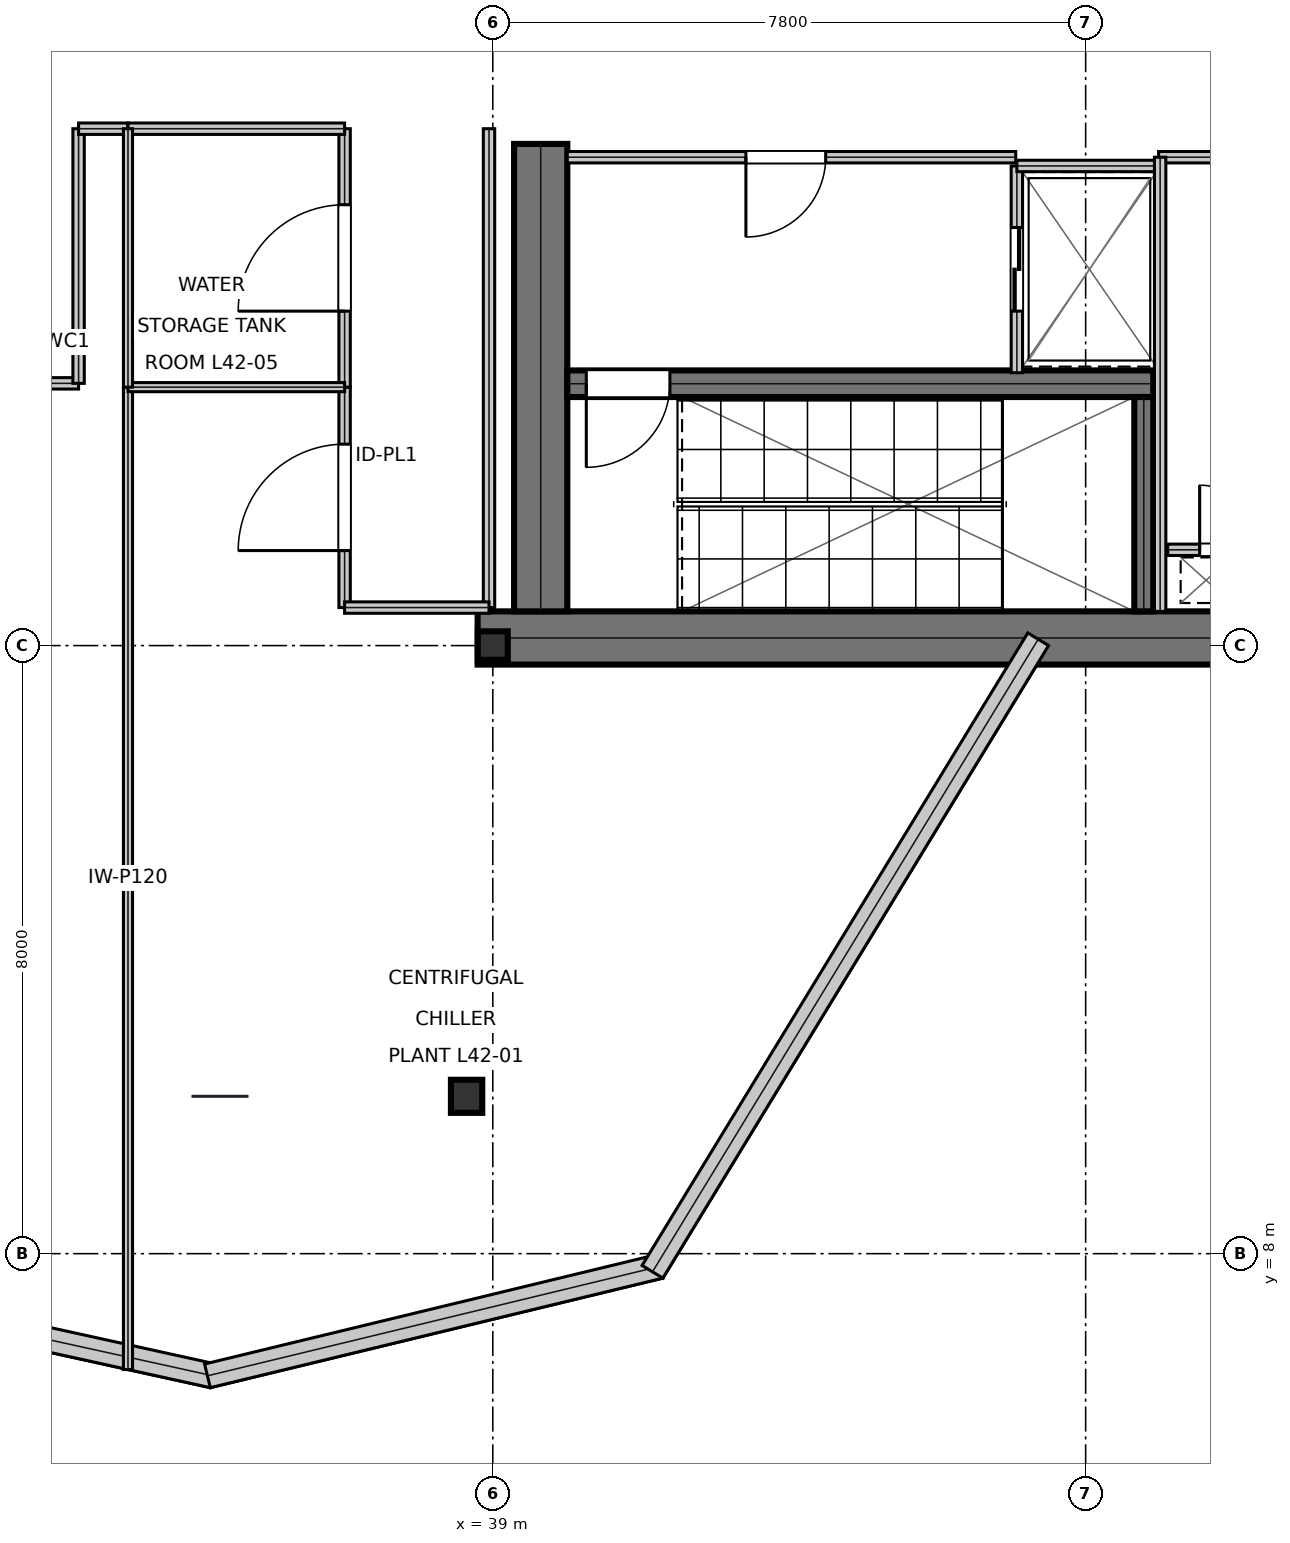
"""IFC4 building model, lengths in metres.
Left out: names, types, materials, properties, quantities, classifications, styles, units other than length and angle.
Written with IfcOpenShell. Run it as: python <this file> out.ifc"""

import sys

from ifc_helpers import new_model, si_unit, direction, frame, frame_2d, origin, origin_2d, place, context, subcontext, project, spatial, rectangle, i_section, extrude, element, fill, save


model = new_model("IFC4")
c1 = context("Model", 3, precision=1e-05, world=origin(), true_north=direction((0.0, 1.0)))
c2 = subcontext(c1, "Body", "Model", "MODEL_VIEW")
j1 = project(units=[si_unit("LENGTHUNIT", "METRE"), si_unit("PLANEANGLEUNIT", "RADIAN")], contexts=[c1])
p1 = place(None, origin())
s1 = spatial("IfcSite", under=j1, at=p1, CompositionType="ELEMENT")
p2 = place(p1, origin())
s2 = spatial("IfcBuilding", under=s1, at=p2, CompositionType="ELEMENT")
p3 = place(p2, frame((0.0, 0.0, 181.65)))
s3 = spatial("IfcBuildingStorey", under=s2, at=p3, CompositionType="ELEMENT", Elevation=181.65)
p4 = place(p3, frame((38.8, 16.1, 0.0), z_axis=(0.0, 0.0, 1.0), x_axis=(1.0, 0.0, 0.0)))
e1 = element("IfcWall", 1, at=p4, inside=s3, PredefinedType="SHEAR", context=c2, shape_type="SweptSolid", body=[
    extrude(rectangle(XDim=16.0, YDim=0.7, at=frame_2d((8.0, 0.0))), origin(), (0.0, 0.0, 1.0), 5.12),
])
p5 = place(p3, frame((39.63, 16.45, 0.0), z_axis=(0.0, 0.0, 1.0), x_axis=(0.0, 1.0, 0.0)))
e2 = element("IfcWall", 2, at=p5, inside=s3, PredefinedType="SHEAR", context=c2, shape_type="SweptSolid", body=[
    extrude(rectangle(XDim=6.15, YDim=0.7, at=frame_2d((3.075, 0.0))), origin(), (0.0, 0.0, 1.0), 5.12),
])
p6 = place(p3, frame((39.98, 19.445, 0.0), z_axis=(0.0, 0.0, 1.0), x_axis=(1.0, 0.0, 0.0)))
e3 = element("IfcWall", 3, at=p6, inside=s3, PredefinedType="SHEAR", context=c2, shape_type="SweptSolid", body=[
    extrude(rectangle(XDim=7.71, YDim=0.35, at=frame_2d((3.855, 0.0))), origin(), (0.0, 0.0, 1.0), 5.12),
])
p7 = place(p6, frame((0.25, 0.0, 0.0)))
e4 = element("IfcOpeningElement", 4, at=p7, cuts=e3, PredefinedType="OPENING", context=c2, shape_type="SweptSolid", body=[
    extrude(rectangle(XDim=1.1, YDim=2.15, at=frame_2d((0.55, 1.075))), frame((0.0, 0.185, 0.0), z_axis=(0.0, -1.0, 0.0), x_axis=(1.0, 0.0, 0.0)), (0.0, 0.0, 1.0), 0.37),
])
p8 = place(p3, frame((47.565, 16.45, 0.0), z_axis=(0.0, 0.0, 1.0), x_axis=(0.0, 1.0, 0.0)))
e5 = element("IfcWall", 5, at=p8, inside=s3, PredefinedType="SHEAR", context=c2, shape_type="SweptSolid", body=[
    extrude(rectangle(XDim=2.82, YDim=0.25, at=frame_2d((1.41, 0.0))), origin(), (0.0, 0.0, 1.0), 5.12),
])
p9 = place(p3, frame((39.0, 16.0, 0.0), z_axis=(0.0, 0.0, 1.0), x_axis=(1.0, 0.0, 0.0)))
e6 = element("IfcColumn", 6, at=p9, inside=s3, PredefinedType="COLUMN", context=c2, shape_type="SweptSolid", body=[
    extrude(i_section(OverallWidth=0.394, OverallDepth=0.375, WebThickness=0.017, FlangeThickness=0.028, at=origin_2d()), origin(), (0.0, 0.0, 1.0), 5.394),
])
p10 = place(p3, frame((38.655, 10.07, 0.016), z_axis=(-0.002410254638, 0.014507004333, 0.999891862902), x_axis=(-0.98647737489, -0.163897494888, 0.0)))
e7 = element("IfcColumn", 7, at=p10, inside=s3, PredefinedType="COLUMN", context=c2, shape_type="SweptSolid", body=[
    extrude(i_section(OverallWidth=0.412, OverallDepth=0.435, WebThickness=0.036, FlangeThickness=0.058, at=origin_2d()), origin(), (0.0, 0.0, 1.0), 5.368),
])
p11 = place(p3, frame((29.363, 7.703, 0.0), z_axis=(0.0, 0.0, 1.0), x_axis=(0.976640937295, -0.21487782482, 0.0)))
e8 = element("IfcWall", 8, at=p11, inside=s3, PredefinedType="STANDARD", context=c2, shape_type="SweptSolid", body=[
    extrude(rectangle(XDim=6.097, YDim=0.32, at=frame_2d((3.048, 0.0))), origin(), (0.0, 0.0, 1.0), 5.12),
])
p12 = place(p3, frame((35.245, 6.393, 0.0), z_axis=(0.0, 0.0, 1.0), x_axis=(0.971945697545, 0.235205359257, 0.0)))
e9 = element("IfcWall", 9, at=p12, inside=s3, PredefinedType="STANDARD", context=c2, shape_type="SweptSolid", body=[
    extrude(rectangle(XDim=6.126, YDim=0.32, at=frame_2d((3.063, 0.0))), origin(), (0.0, 0.0, 1.0), 5.12),
])
p13 = place(p3, frame((41.101, 7.761, 0.0), z_axis=(0.0, 0.0, 1.0), x_axis=(0.520630135962, 0.853782326784, 0.0)))
e10 = element("IfcWall", 10, at=p13, inside=s3, PredefinedType="STANDARD", context=c2, shape_type="SweptSolid", body=[
    extrude(rectangle(XDim=9.747, YDim=0.32, at=frame_2d((4.874, 0.0))), origin(), (0.0, 0.0, 1.0), 4.649),
])
p14 = place(p3, frame((39.98, 22.425, 0.0), z_axis=(0.0, 0.0, 1.0), x_axis=(1.0, 0.0, 0.0)))
e11 = element("IfcWall", 11, at=p14, inside=s3, PredefinedType="PARTITIONING", context=c2, shape_type="SweptSolid", body=[
    extrude(rectangle(XDim=5.9, YDim=0.15, at=frame_2d((2.95, 0.0))), origin(), (0.0, 0.0, 1.0), 5.12),
])
p15 = place(p14, frame((2.35, 0.0, 0.0)))
e12 = element("IfcOpeningElement", 12, at=p15, cuts=e11, PredefinedType="OPENING", context=c2, shape_type="SweptSolid", body=[
    extrude(rectangle(XDim=1.05, YDim=2.15, at=frame_2d((0.525, 1.075))), frame((0.0, 0.085, 0.0), z_axis=(0.0, -1.0, 0.0), x_axis=(1.0, 0.0, 0.0)), (0.0, 0.0, 1.0), 0.17),
])
p16 = place(p3, frame((45.895, 19.59, 0.0), z_axis=(0.0, 0.0, 1.0), x_axis=(0.0, 1.0, 0.0)))
e13 = element("IfcWall", 13, at=p16, inside=s3, PredefinedType="PARTITIONING", context=c2, shape_type="SweptSolid", body=[
    extrude(rectangle(XDim=2.72, YDim=0.15, at=frame_2d((1.36, 0.0))), origin(), (0.0, 0.0, 1.0), 5.12),
])
p17 = place(p16, frame((0.81, 0.0, 0.0)))
e14 = element("IfcOpeningElement", 14, at=p17, cuts=e13, PredefinedType="OPENING", context=c2, shape_type="SweptSolid", body=[
    extrude(rectangle(XDim=1.1, YDim=2.15, at=frame_2d((0.55, 1.075))), frame((0.0, 0.085, 0.0), z_axis=(0.0, -1.0, 0.0), x_axis=(1.0, 0.0, 0.0)), (0.0, 0.0, 1.0), 0.17),
])
p18 = place(p3, frame((45.895, 22.31, 0.0), z_axis=(0.0, 0.0, 1.0), x_axis=(1.0, 0.0, 0.0)))
e15 = element("IfcWall", 15, at=p18, inside=s3, PredefinedType="PARTITIONING", context=c2, shape_type="SweptSolid", body=[
    extrude(rectangle(XDim=1.915, YDim=0.15, at=frame_2d((0.958, 0.0))), origin(), (0.0, 0.0, 1.0), 5.12),
])
p19 = place(p3, frame((47.88, 17.26, 0.0), z_axis=(0.0, 0.0, 1.0), x_axis=(1.0, 0.0, 0.0)))
e16 = element("IfcWall", 16, at=p19, inside=s3, PredefinedType="PARTITIONING", context=c2, shape_type="SweptSolid", body=[
    extrude(rectangle(XDim=1.72, YDim=0.15, at=frame_2d((0.86, 0.0))), origin(), (0.0, 0.0, 1.0), 5.12),
])
p20 = place(p19, frame((0.42, 0.0, 0.0)))
e17 = element("IfcOpeningElement", 17, at=p20, cuts=e16, PredefinedType="OPENING", context=c2, shape_type="SweptSolid", body=[
    extrude(rectangle(XDim=0.85, YDim=2.15, at=frame_2d((0.425, 1.075))), frame((0.0, 0.085, 0.0), z_axis=(0.0, -1.0, 0.0), x_axis=(1.0, 0.0, 0.0)), (0.0, 0.0, 1.0), 0.17),
])
p21 = place(p3, frame((47.76, 22.425, 0.0), z_axis=(0.0, 0.0, 1.0), x_axis=(1.0, 0.0, 0.0)))
e18 = element("IfcWall", 18, at=p21, inside=s3, PredefinedType="PARTITIONING", context=c2, shape_type="SweptSolid", body=[
    extrude(rectangle(XDim=1.96, YDim=0.15, at=frame_2d((0.98, 0.0))), origin(), (0.0, 0.0, 1.0), 5.12),
])
p22 = place(p3, frame((47.78, 16.45, 0.0), z_axis=(0.0, 0.0, 1.0), x_axis=(0.0, 1.0, 0.0)))
e19 = element("IfcWall", 19, at=p22, inside=s3, PredefinedType="PARTITIONING", context=c2, shape_type="SweptSolid", body=[
    extrude(rectangle(XDim=5.975, YDim=0.15, at=frame_2d((2.988, 0.0))), origin(), (0.0, 0.0, 1.0), 5.12),
])
p23 = place(p3, frame((37.05, 16.5, 0.0), z_axis=(0.0, 0.0, 1.0), x_axis=(0.0, 1.0, 0.0)))
e20 = element("IfcWall", 20, at=p23, inside=s3, PredefinedType="PARTITIONING", context=c2, shape_type="SweptSolid", body=[
    extrude(rectangle(XDim=2.9, YDim=0.15, at=frame_2d((1.45, 0.0))), origin(), (0.0, 0.0, 1.0), 4.798),
])
p24 = place(p23, frame((0.75, 0.0, 0.0)))
e21 = element("IfcOpeningElement", 21, at=p24, cuts=e20, PredefinedType="OPENING", context=c2, shape_type="SweptSolid", body=[
    extrude(rectangle(XDim=1.4, YDim=2.2, at=frame_2d((0.7, 1.1))), frame((0.0, 0.085, 0.0), z_axis=(0.0, -1.0, 0.0), x_axis=(1.0, 0.0, 0.0)), (0.0, 0.0, 1.0), 0.17),
])
p25 = place(p3, frame((31.8, 19.45, 0.0), z_axis=(0.0, 0.0, 1.0), x_axis=(1.0, 0.0, 0.0)))
e22 = element("IfcWall", 22, at=p25, inside=s3, PredefinedType="PARTITIONING", context=c2, shape_type="SweptSolid", body=[
    extrude(rectangle(XDim=1.75, YDim=0.15, at=frame_2d((0.875, 0.0))), origin(), (0.0, 0.0, 1.0), 5.12),
])
p26 = place(p25, frame((0.45, 0.0, 0.0)))
e23 = element("IfcOpeningElement", 23, at=p26, cuts=e22, PredefinedType="OPENING", context=c2, shape_type="SweptSolid", body=[
    extrude(rectangle(XDim=0.85, YDim=2.15, at=frame_2d((0.425, 1.075))), frame((0.0, 0.085, 0.0), z_axis=(0.0, -1.0, 0.0), x_axis=(1.0, 0.0, 0.0)), (0.0, 0.0, 1.0), 0.17),
])
p27 = place(p3, frame((37.05, 19.4, 0.0), z_axis=(0.0, 0.0, 1.0), x_axis=(0.0, 1.0, 0.0)))
e24 = element("IfcWall", 24, at=p27, inside=s3, PredefinedType="PARTITIONING", context=c2, shape_type="SweptSolid", body=[
    extrude(rectangle(XDim=3.4, YDim=0.15, at=frame_2d((1.7, 0.0))), origin(), (0.0, 0.0, 1.0), 4.798),
])
p28 = place(p27, frame((1.0, 0.0, 0.0)))
e25 = element("IfcOpeningElement", 25, at=p28, cuts=e24, PredefinedType="OPENING", context=c2, shape_type="SweptSolid", body=[
    extrude(rectangle(XDim=1.4, YDim=2.2, at=frame_2d((0.7, 1.1))), frame((0.0, 0.085, 0.0), z_axis=(0.0, -1.0, 0.0), x_axis=(1.0, 0.0, 0.0)), (0.0, 0.0, 1.0), 0.17),
])
p29 = place(p3, frame((38.95, 16.5, 0.0), z_axis=(0.0, 0.0, 1.0), x_axis=(0.0, 1.0, 0.0)))
e26 = element("IfcWall", 26, at=p29, inside=s3, PredefinedType="PARTITIONING", context=c2, shape_type="SweptSolid", body=[
    extrude(rectangle(XDim=6.3, YDim=0.15, at=frame_2d((3.15, 0.0))), origin(), (0.0, 0.0, 1.0), 4.798),
])
p30 = place(p3, frame((37.05, 16.5, 0.0), z_axis=(0.0, 0.0, 1.0), x_axis=(1.0, 0.0, 0.0)))
e27 = element("IfcWall", 27, at=p30, inside=s3, PredefinedType="PARTITIONING", context=c2, shape_type="SweptSolid", body=[
    extrude(rectangle(XDim=1.9, YDim=0.15, at=frame_2d((0.95, 0.0))), origin(), (0.0, 0.0, 1.0), 5.12),
])
p31 = place(p3, frame((33.55, 19.45, 0.0), z_axis=(0.0, 0.0, 1.0), x_axis=(0.0, 1.0, 0.0)))
e28 = element("IfcWall", 28, at=p31, inside=s3, PredefinedType="PARTITIONING", context=c2, shape_type="SweptSolid", body=[
    extrude(rectangle(XDim=3.35, YDim=0.15, at=frame_2d((1.675, 0.0))), origin(), (0.0, 0.0, 1.0), 4.798),
])
p32 = place(p3, frame((33.55, 22.8, 0.0), z_axis=(0.0, 0.0, 1.0), x_axis=(1.0, 0.0, 0.0)))
e29 = element("IfcWall", 29, at=p32, inside=s3, PredefinedType="PARTITIONING", context=c2, shape_type="SweptSolid", body=[
    extrude(rectangle(XDim=0.65, YDim=0.15, at=frame_2d((0.325, 0.0))), origin(), (0.0, 0.0, 1.0), 5.12),
])
p33 = place(p3, frame((34.2, 22.8, 0.0), z_axis=(0.0, 0.0, 1.0), x_axis=(1.0, 0.0, 0.0)))
e30 = element("IfcWall", 30, at=p33, inside=s3, PredefinedType="PARTITIONING", context=c2, shape_type="SweptSolid", body=[
    extrude(rectangle(XDim=2.85, YDim=0.15, at=frame_2d((1.425, 0.0))), origin(), (0.0, 0.0, 1.0), 5.12),
])
p34 = place(p3, frame((34.2, 6.475, 0.0), z_axis=(0.0, 0.0, 1.0), x_axis=(0.0, 1.0, 0.0)))
e31 = element("IfcWall", 31, at=p34, inside=s3, PredefinedType="PARTITIONING", context=c2, shape_type="SweptSolid", body=[
    extrude(rectangle(XDim=12.925, YDim=0.12, at=frame_2d((6.462, 0.0))), origin(), (0.0, 0.0, 1.0), 4.571),
])
p35 = place(p3, frame((34.2, 19.4, 0.0), z_axis=(0.0, 0.0, 1.0), x_axis=(1.0, 0.0, 0.0)))
e32 = element("IfcWall", 32, at=p35, inside=s3, PredefinedType="PARTITIONING", context=c2, shape_type="SweptSolid", body=[
    extrude(rectangle(XDim=2.85, YDim=0.12, at=frame_2d((1.425, 0.0))), origin(), (0.0, 0.0, 1.0), 5.12),
])
p36 = place(p3, frame((34.2, 19.4, 0.0), z_axis=(0.0, 0.0, 1.0), x_axis=(0.0, 1.0, 0.0)))
e33 = element("IfcWall", 33, at=p36, inside=s3, PredefinedType="PARTITIONING", context=c2, shape_type="SweptSolid", body=[
    extrude(rectangle(XDim=3.4, YDim=0.12, at=frame_2d((1.7, 0.0))), origin(), (0.0, 0.0, 1.0), 5.12),
])
p37 = place(p15, frame((1.05, 0.0, 0.0), z_axis=(0.0, 0.0, 1.0), x_axis=(-1.0, 0.0, 0.0)))
e34 = element("IfcDoor", 34, at=p37, inside=s3, OperationType="SINGLE_SWING_RIGHT", PredefinedType="DOOR", context=c2, shape_type="SweptSolid", body=[
    extrude(rectangle(XDim=1.05, YDim=2.15, at=frame_2d((0.525, 1.075))), frame((0.0, 0.025, 0.0), z_axis=(0.0, -1.0, 0.0), x_axis=(1.0, 0.0, 0.0)), (0.0, 0.0, 1.0), 0.05),
])
fill(e12, e34)
p38 = place(p17, frame((1.1, 0.0, 0.0), z_axis=(0.0, 0.0, 1.0), x_axis=(-1.0, 0.0, 0.0)))
e35 = element("IfcDoor", 35, at=p38, inside=s3, OperationType="DOUBLE_DOOR_SLIDING", PredefinedType="DOOR", context=c2, shape_type="SweptSolid", body=[
    extrude(rectangle(XDim=1.1, YDim=2.15, at=frame_2d((0.55, 1.075))), frame((0.0, 0.025, 0.0), z_axis=(0.0, -1.0, 0.0), x_axis=(1.0, 0.0, 0.0)), (0.0, 0.0, 1.0), 0.05),
])
fill(e14, e35)
p39 = place(p20, origin())
e36 = element("IfcDoor", 36, at=p39, inside=s3, OperationType="SINGLE_SWING_LEFT", PredefinedType="TRAPDOOR", context=c2, shape_type="SweptSolid", body=[
    extrude(rectangle(XDim=0.85, YDim=2.15, at=frame_2d((0.425, 1.075))), frame((0.0, 0.025, 0.0), z_axis=(0.0, -1.0, 0.0), x_axis=(1.0, 0.0, 0.0)), (0.0, 0.0, 1.0), 0.05),
])
fill(e17, e36)
p40 = place(p24, origin())
e37 = element("IfcDoor", 37, at=p40, inside=s3, OperationType="SINGLE_SWING_LEFT", PredefinedType="DOOR", context=c2, shape_type="SweptSolid", body=[
    extrude(rectangle(XDim=1.4, YDim=2.2, at=frame_2d((0.7, 1.1))), frame((0.0, 0.025, 0.0), z_axis=(0.0, -1.0, 0.0), x_axis=(1.0, 0.0, 0.0)), (0.0, 0.0, 1.0), 0.05),
])
fill(e21, e37)
p41 = place(p28, origin())
e38 = element("IfcDoor", 38, at=p41, inside=s3, OperationType="SINGLE_SWING_LEFT", PredefinedType="DOOR", context=c2, shape_type="SweptSolid", body=[
    extrude(rectangle(XDim=1.4, YDim=2.2, at=frame_2d((0.7, 1.1))), frame((0.0, 0.025, 0.0), z_axis=(0.0, -1.0, 0.0), x_axis=(1.0, 0.0, 0.0)), (0.0, 0.0, 1.0), 0.05),
])
fill(e25, e38)
p42 = place(p7, frame((1.1, 0.0, 0.0), z_axis=(0.0, 0.0, 1.0), x_axis=(-1.0, 0.0, 0.0)))
e39 = element("IfcDoor", 39, at=p42, inside=s3, OperationType="SINGLE_SWING_RIGHT", PredefinedType="DOOR", context=c2, shape_type="SweptSolid", body=[
    extrude(rectangle(XDim=1.1, YDim=2.15, at=frame_2d((0.55, 1.075))), frame((0.0, 0.025, 0.0), z_axis=(0.0, -1.0, 0.0), x_axis=(1.0, 0.0, 0.0)), (0.0, 0.0, 1.0), 0.05),
])
fill(e4, e39)
save(model, sys.argv[1])
